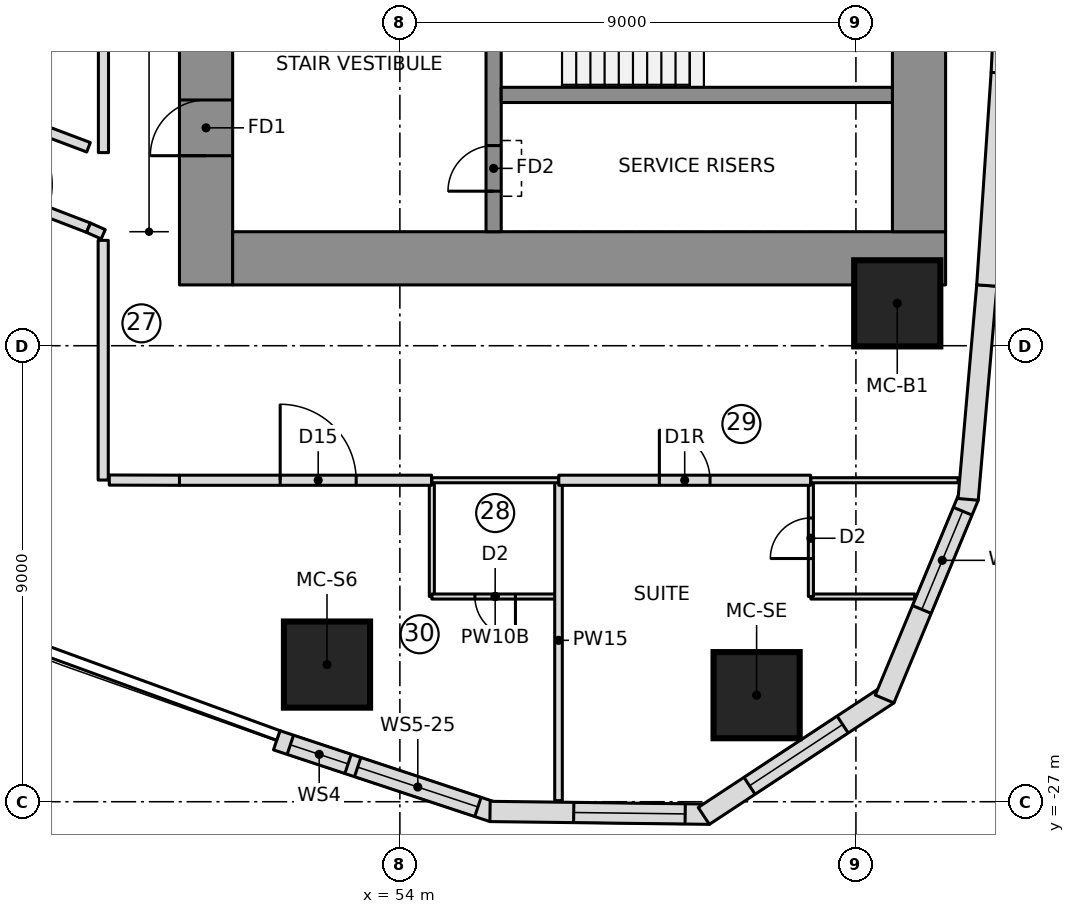
"""IFC4 building model, lengths in metres.
Left out: names, types, materials, properties, quantities, classifications, styles, units other than length and angle.
Written with IfcOpenShell. Run it as: python <this file> out.ifc"""

import sys

from ifc_helpers import new_model, si_unit, direction, frame, frame_2d, origin, origin_2d, place, context, subcontext, project, spatial, polyline, rectangle, outline, extrude, element, fill, save


model = new_model("IFC4")
c1 = context("Model", 3, precision=1e-05, world=origin(), true_north=direction((0.0, 1.0)))
c2 = subcontext(c1, "Body", "Model", "MODEL_VIEW")
j1 = project(units=[si_unit("LENGTHUNIT", "METRE"), si_unit("PLANEANGLEUNIT", "RADIAN")], contexts=[c1])
p1 = place(None, origin())
s1 = spatial("IfcSite", under=j1, at=p1, CompositionType="ELEMENT")
p2 = place(p1, origin())
s2 = spatial("IfcBuilding", under=s1, at=p2, CompositionType="ELEMENT")
p3 = place(p2, frame((0.0, 0.0, 84.9)))
s3 = spatial("IfcBuildingStorey", under=s2, at=p3, CompositionType="ELEMENT", Elevation=84.9)
p4 = place(p3, frame((50.175, -16.8, 0.0), z_axis=(0.0, 0.0, 1.0), x_axis=(0.0, 1.0, 0.0)))
e1 = element("IfcWall", 1, at=p4, inside=s3, PredefinedType="SHEAR", context=c2, shape_type="SweptSolid", body=[
    extrude(rectangle(XDim=10.15, YDim=1.05, at=frame_2d((5.075, 0.0))), origin(), (0.0, 0.0, 1.0), 3.55),
])
p5 = place(p4, frame((2.55, 0.0, 0.0)))
e2 = element("IfcOpeningElement", 2, at=p5, cuts=e1, PredefinedType="OPENING", context=c2, shape_type="SweptSolid", body=[
    extrude(rectangle(XDim=1.1, YDim=2.1, at=frame_2d((0.55, 1.05))), frame((0.0, 0.535, 0.0), z_axis=(0.0, -1.0, 0.0), x_axis=(1.0, 0.0, 0.0)), (0.0, 0.0, 1.0), 1.07),
])
p6 = place(p3, frame((50.7, -16.275, 0.0), z_axis=(0.0, 0.0, 1.0), x_axis=(1.0, 0.0, 0.0)))
e3 = element("IfcWall", 3, at=p6, inside=s3, PredefinedType="SHEAR", context=c2, shape_type="SweptSolid", body=[
    extrude(rectangle(XDim=14.07, YDim=1.05, at=frame_2d((7.035, 0.0))), origin(), (0.0, 0.0, 1.0), 3.55),
])
p7 = place(p3, frame((64.245, -15.75, 0.0), z_axis=(0.0, 0.0, 1.0), x_axis=(0.0, 1.0, 0.0)))
e4 = element("IfcWall", 4, at=p7, inside=s3, PredefinedType="SHEAR", context=c2, shape_type="SweptSolid", body=[
    extrude(rectangle(XDim=6.361, YDim=1.05, at=frame_2d((3.181, 0.0))), origin(), (0.0, 0.0, 1.0), 3.55),
])
p8 = place(p3, frame((55.85, -15.75, 0.0), z_axis=(0.0, 0.0, 1.0), x_axis=(0.0, 1.0, 0.0)))
e5 = element("IfcWall", 5, at=p8, inside=s3, PredefinedType="SHEAR", context=c2, shape_type="SweptSolid", body=[
    extrude(rectangle(XDim=5.4, YDim=0.3, at=frame_2d((2.7, 0.0))), origin(), (0.0, 0.0, 1.0), 3.55),
])
p9 = place(p8, frame((3.6, 0.0, 0.0)))
e6 = element("IfcOpeningElement", 6, at=p9, cuts=e5, PredefinedType="OPENING", context=c2, shape_type="SweptSolid", body=[
    extrude(rectangle(XDim=1.1, YDim=2.1, at=frame_2d((0.55, 1.05))), frame((0.0, 0.16, 0.0), z_axis=(0.0, -1.0, 0.0), x_axis=(1.0, 0.0, 0.0)), (0.0, 0.0, 1.0), 0.32),
])
p10 = place(p8, frame((0.8, 0.0, 0.0)))
e7 = element("IfcOpeningElement", 7, at=p10, cuts=e5, PredefinedType="OPENING", context=c2, shape_type="SweptSolid", body=[
    extrude(rectangle(XDim=0.9, YDim=2.1, at=frame_2d((0.45, 1.05))), frame((0.0, 0.16, 0.0), z_axis=(0.0, -1.0, 0.0), x_axis=(1.0, 0.0, 0.0)), (0.0, 0.0, 1.0), 0.32),
])
p11 = place(p3, frame((56.0, -13.05, 0.0), z_axis=(0.0, 0.0, 1.0), x_axis=(1.0, 0.0, 0.0)))
e8 = element("IfcWall", 8, at=p11, inside=s3, PredefinedType="SHEAR", context=c2, shape_type="SweptSolid", body=[
    extrude(rectangle(XDim=7.72, YDim=0.3, at=frame_2d((3.86, 0.0))), origin(), (0.0, 0.0, 1.0), 3.55),
])
for number, where, z_axis, x_axis in (
    (9, (52.562, -24.293, 0.0), (0.0, 0.0, 1.0), (1.0, 0.0, 0.0)),
    (10, (61.04, -24.897, 0.0), (0.0, 0.0, 1.0), (1.0, 0.0, 0.0)),
    (11, (63.816, -17.164, 0.0), (0.0, 0.0, 1.0), (1.0, 0.0, 0.0)),
):
    element("IfcColumn", number, at=place(p3, frame(where, z_axis=z_axis, x_axis=x_axis)), inside=s3, PredefinedType="COLUMN", context=c2, shape_type="SweptSolid", body=[
        extrude(rectangle(XDim=1.7, YDim=1.7, at=origin_2d()), origin(), (0.0, 0.0, 1.0), 3.55),
    ])
p12 = place(p3, frame((51.569, -25.787, 0.0), z_axis=(0.0, 0.0, 1.0), x_axis=(0.94925004851, -0.314522408429, 0.0)))
e12 = element("IfcWall", 12, at=p12, inside=s3, PredefinedType="NOTDEFINED", context=c2, shape_type="SweptSolid", body=[
    extrude(outline(polyline([(0.0, -0.2), (4.499, -0.2), (4.437, 0.2), (0.0, 0.2), (0.0, -0.2)])), origin(), (0.0, 0.0, 1.0), 3.25),
])
p13 = place(p12, frame((0.284, 0.0, 0.9)))
e13 = element("IfcOpeningElement", 13, at=p13, cuts=e12, PredefinedType="OPENING", context=c2, shape_type="SweptSolid", body=[
    extrude(rectangle(XDim=1.2, YDim=1.8, at=frame_2d((0.6, 0.9))), frame((0.0, 0.21, 0.0), z_axis=(0.0, -1.0, 0.0), x_axis=(1.0, 0.0, 0.0)), (0.0, 0.0, 1.0), 0.42),
])
p14 = place(p12, frame((1.684, 0.0, 0.9)))
e14 = element("IfcOpeningElement", 14, at=p14, cuts=e12, PredefinedType="OPENING", context=c2, shape_type="SweptSolid", body=[
    extrude(rectangle(XDim=2.5, YDim=1.8, at=frame_2d((1.25, 0.9))), frame((0.0, 0.21, 0.0), z_axis=(0.0, -1.0, 0.0), x_axis=(1.0, 0.0, 0.0)), (0.0, 0.0, 1.0), 0.42),
])
p15 = place(p3, frame((55.81, -27.192, 0.0), z_axis=(0.0, 0.0, 1.0), x_axis=(0.999919718849, -0.012671063772, 0.0)))
e15 = element("IfcWall", 15, at=p15, inside=s3, PredefinedType="NOTDEFINED", context=c2, shape_type="SweptSolid", body=[
    extrude(outline(polyline([(-0.031, -0.2), (4.3, -0.2), (4.177, 0.2), (0.031, 0.2), (-0.031, -0.2)])), origin(), (0.0, 0.0, 1.0), 3.25),
])
p16 = place(p15, frame((1.621, 0.0, 0.6)))
e16 = element("IfcOpeningElement", 16, at=p16, cuts=e15, PredefinedType="OPENING", context=c2, shape_type="SweptSolid", body=[
    extrude(outline(polyline([(0.0, 1.35), (0.084, 1.771), (0.322, 2.128), (0.679, 2.366), (1.1, 2.45), (1.521, 2.366), (1.878, 2.128), (2.116, 1.771), (2.2, 1.35), (2.2, 1.1), (2.116, 0.679), (1.878, 0.322), (1.521, 0.084), (1.1, 0.0), (0.679, 0.084), (0.322, 0.322), (0.084, 0.679), (0.0, 1.1), (0.0, 1.35)])), frame((0.0, 0.21, 0.0), z_axis=(0.0, -1.0, 0.0), x_axis=(1.0, 0.0, 0.0)), (0.0, 0.0, 1.0), 0.42),
])
p17 = place(p3, frame((60.049, -27.246, 0.0), z_axis=(0.0, 0.0, 1.0), x_axis=(0.835340523653, 0.549732852887, 0.0)))
e17 = element("IfcWall", 17, at=p17, inside=s3, PredefinedType="NOTDEFINED", context=c2, shape_type="SweptSolid", body=[
    extrude(outline(polyline([(-0.061, -0.2), (4.3, -0.2), (4.178, 0.2), (0.061, 0.2), (-0.061, -0.2)])), origin(), (0.0, 0.0, 1.0), 3.25),
])
p18 = place(p17, frame((1.02, 0.0, 0.6)))
e18 = element("IfcOpeningElement", 18, at=p18, cuts=e17, PredefinedType="OPENING", context=c2, shape_type="SweptSolid", body=[
    extrude(outline(polyline([(0.0, 1.35), (0.084, 1.771), (0.322, 2.128), (0.679, 2.366), (1.1, 2.45), (1.521, 2.366), (1.878, 2.128), (2.116, 1.771), (2.2, 1.35), (2.2, 1.1), (2.116, 0.679), (1.878, 0.322), (1.521, 0.084), (1.1, 0.0), (0.679, 0.084), (0.322, 0.322), (0.084, 0.679), (0.0, 1.1), (0.0, 1.35)])), frame((0.0, 0.21, 0.0), z_axis=(0.0, -1.0, 0.0), x_axis=(1.0, 0.0, 0.0)), (0.0, 0.0, 1.0), 0.42),
])
p19 = place(p3, frame((63.59, -24.916, 0.0), z_axis=(0.0, 0.0, 1.0), x_axis=(0.383997751971, 0.923334027577, 0.0)))
e19 = element("IfcWall", 19, at=p19, inside=s3, PredefinedType="NOTDEFINED", context=c2, shape_type="SweptSolid", body=[
    extrude(outline(polyline([(-0.061, -0.2), (4.27, -0.2), (4.208, 0.2), (0.061, 0.2), (-0.061, -0.2)])), origin(), (0.0, 0.0, 1.0), 3.25),
])
p20 = place(p19, frame((1.852, 0.0, 0.6)))
e20 = element("IfcOpeningElement", 20, at=p20, cuts=e19, PredefinedType="OPENING", context=c2, shape_type="SweptSolid", body=[
    extrude(outline(polyline([(0.0, 1.4), (0.08, 1.802), (0.308, 2.142), (0.648, 2.37), (1.05, 2.45), (1.452, 2.37), (1.792, 2.142), (2.02, 1.802), (2.1, 1.4), (2.1, 1.05), (2.02, 0.648), (1.792, 0.308), (1.452, 0.08), (1.05, 0.0), (0.648, 0.08), (0.308, 0.308), (0.08, 0.648), (0.0, 1.05), (0.0, 1.4)])), frame((0.0, 0.21, 0.0), z_axis=(0.0, -1.0, 0.0), x_axis=(1.0, 0.0, 0.0)), (0.0, 0.0, 1.0), 0.42),
])
p21 = place(p3, frame((65.217, -21.002, 0.0), z_axis=(0.0, 0.0, 1.0), x_axis=(0.086992730434, 0.996208946382, 0.0)))
e21 = element("IfcWall", 21, at=p21, inside=s3, PredefinedType="NOTDEFINED", context=c2, shape_type="SweptSolid", body=[
    extrude(outline(polyline([(-0.031, -0.2), (4.209, -0.2), (4.205, 0.2), (0.031, 0.2), (-0.031, -0.2)])), origin(), (0.0, 0.0, 1.0), 3.25),
])
p22 = place(p3, frame((65.583, -16.811, 0.0), z_axis=(0.0, 0.0, 1.0), x_axis=(0.067724559895, 0.997704056315, 0.0)))
e22 = element("IfcWall", 22, at=p22, inside=s3, PredefinedType="NOTDEFINED", context=c2, shape_type="SweptSolid", body=[
    extrude(outline(polyline([(-0.002, -0.2), (4.209, -0.2), (4.205, 0.2), (0.002, 0.2), (-0.002, -0.2)])), origin(), (0.0, 0.0, 1.0), 3.25),
])
p23 = place(p3, frame((65.868, -12.614, 0.0), z_axis=(0.0, 0.0, 1.0), x_axis=(0.048342691508, 0.998830808585, 0.0)))
e23 = element("IfcWall", 23, at=p23, inside=s3, PredefinedType="NOTDEFINED", context=c2, shape_type="SweptSolid", body=[
    extrude(outline(polyline([(-0.002, -0.2), (4.209, -0.2), (4.205, 0.2), (0.002, 0.2), (-0.002, -0.2)])), origin(), (0.0, 0.0, 1.0), 3.25),
])
p24 = place(p3, frame((54.631, -22.95, 0.0), z_axis=(0.0, 0.0, 1.0), x_axis=(0.0, 1.0, 0.0)))
e24 = element("IfcWall", 24, at=p24, inside=s3, PredefinedType="PARTITIONING", context=c2, shape_type="SweptSolid", body=[
    extrude(rectangle(XDim=2.3, YDim=0.1, at=frame_2d((1.15, 0.0))), origin(), (0.0, 0.0, 1.0), 3.25),
])
p25 = place(p3, frame((57.131, -22.95, 0.0), z_axis=(0.0, 0.0, 1.0), x_axis=(-1.0, 0.0, 0.0)))
e25 = element("IfcWall", 25, at=p25, inside=s3, PredefinedType="PARTITIONING", context=c2, shape_type="SweptSolid", body=[
    extrude(rectangle(XDim=2.5, YDim=0.1, at=frame_2d((1.25, 0.0))), origin(), (0.0, 0.0, 1.0), 3.25),
])
p26 = place(p25, frame((0.85, 0.0, 0.0)))
e26 = element("IfcOpeningElement", 26, at=p26, cuts=e25, PredefinedType="OPENING", context=c2, shape_type="SweptSolid", body=[
    extrude(rectangle(XDim=0.8, YDim=2.1, at=frame_2d((0.4, 1.05))), frame((0.0, 0.06, 0.0), z_axis=(0.0, -1.0, 0.0), x_axis=(1.0, 0.0, 0.0)), (0.0, 0.0, 1.0), 0.12),
])
p27 = place(p3, frame((64.16, -22.95, 0.0), z_axis=(0.0, 0.0, 1.0), x_axis=(-1.0, 0.0, 0.0)))
e27 = element("IfcWall", 27, at=p27, inside=s3, PredefinedType="PARTITIONING", context=c2, shape_type="SweptSolid", body=[
    extrude(rectangle(XDim=2.049, YDim=0.1, at=frame_2d((1.025, 0.0))), origin(), (0.0, 0.0, 1.0), 3.25),
])
p28 = place(p3, frame((62.111, -22.95, 0.0), z_axis=(0.0, 0.0, 1.0), x_axis=(0.0, 1.0, 0.0)))
e28 = element("IfcWall", 28, at=p28, inside=s3, PredefinedType="PARTITIONING", context=c2, shape_type="SweptSolid", body=[
    extrude(rectangle(XDim=2.3, YDim=0.1, at=frame_2d((1.15, 0.0))), origin(), (0.0, 0.0, 1.0), 3.25),
])
p29 = place(p28, frame((0.75, 0.0, 0.0)))
e29 = element("IfcOpeningElement", 29, at=p29, cuts=e28, PredefinedType="OPENING", context=c2, shape_type="SweptSolid", body=[
    extrude(rectangle(XDim=0.8, YDim=2.1, at=frame_2d((0.4, 1.05))), frame((0.0, 0.06, 0.0), z_axis=(0.0, -1.0, 0.0), x_axis=(1.0, 0.0, 0.0)), (0.0, 0.0, 1.0), 0.12),
])
p30 = place(p3, frame((57.131, -26.979, 0.0), z_axis=(0.0, 0.0, 1.0), x_axis=(0.0, 1.0, 0.0)))
e30 = element("IfcWall", 30, at=p30, inside=s3, PredefinedType="PARTITIONING", context=c2, shape_type="SweptSolid", body=[
    extrude(rectangle(XDim=6.329, YDim=0.15, at=frame_2d((3.165, 0.0))), origin(), (0.0, 0.0, 1.0), 3.25),
])
p31 = place(p3, frame((49.65, -20.655, 0.0), z_axis=(0.0, 0.0, 1.0), x_axis=(1.0, 0.0, 0.0)))
e31 = element("IfcWall", 31, at=p31, inside=s3, PredefinedType="PARTITIONING", context=c2, shape_type="SweptSolid", body=[
    extrude(rectangle(XDim=4.976, YDim=0.2, at=frame_2d((2.488, 0.0))), origin(), (0.0, 0.0, 1.0), 3.25),
])
p32 = place(p31, frame((1.988, 0.0, 0.0)))
e32 = element("IfcOpeningElement", 32, at=p32, cuts=e31, PredefinedType="OPENING", context=c2, shape_type="SweptSolid", body=[
    extrude(rectangle(XDim=1.5, YDim=2.1, at=frame_2d((0.75, 1.05))), frame((0.0, 0.11, 0.0), z_axis=(0.0, -1.0, 0.0), x_axis=(1.0, 0.0, 0.0)), (0.0, 0.0, 1.0), 0.22),
])
p33 = place(p3, frame((57.135, -20.655, 0.0), z_axis=(0.0, 0.0, 1.0), x_axis=(1.0, 0.0, 0.0)))
e33 = element("IfcWall", 33, at=p33, inside=s3, PredefinedType="PARTITIONING", context=c2, shape_type="SweptSolid", body=[
    extrude(rectangle(XDim=4.971, YDim=0.2, at=frame_2d((2.485, 0.0))), origin(), (0.0, 0.0, 1.0), 3.25),
])
p34 = place(p33, frame((1.985, 0.0, 0.0)))
e34 = element("IfcOpeningElement", 34, at=p34, cuts=e33, PredefinedType="OPENING", context=c2, shape_type="SweptSolid", body=[
    extrude(rectangle(XDim=1.0, YDim=2.1, at=frame_2d((0.5, 1.05))), frame((0.0, 0.11, 0.0), z_axis=(0.0, -1.0, 0.0), x_axis=(1.0, 0.0, 0.0)), (0.0, 0.0, 1.0), 0.22),
])
p35 = place(p3, frame((54.631, -20.655, 0.0), z_axis=(0.0, 0.0, 1.0), x_axis=(1.0, 0.0, 0.0)))
e35 = element("IfcWall", 35, at=p35, inside=s3, PredefinedType="PARTITIONING", context=c2, shape_type="SweptSolid", body=[
    extrude(rectangle(XDim=2.5, YDim=0.1, at=frame_2d((1.25, 0.0))), origin(), (0.0, 0.0, 1.0), 3.25),
])
p36 = place(p3, frame((62.111, -20.655, 0.0), z_axis=(0.0, 0.0, 1.0), x_axis=(1.0, 0.0, 0.0)))
e36 = element("IfcWall", 36, at=p36, inside=s3, PredefinedType="PARTITIONING", context=c2, shape_type="SweptSolid", body=[
    extrude(rectangle(XDim=2.906, YDim=0.1, at=frame_2d((1.453, 0.0))), origin(), (0.0, 0.0, 1.0), 3.25),
])
p37 = place(p3, frame((42.791, -13.724, 0.0), z_axis=(0.0, 0.0, 1.0), x_axis=(0.933356043573, -0.358951940969, 0.0)))
e37 = element("IfcWall", 37, at=p37, inside=s3, PredefinedType="PARTITIONING", context=c2, shape_type="SweptSolid", body=[
    extrude(rectangle(XDim=5.426, YDim=0.2, at=frame_2d((2.713, 0.0))), origin(), (0.0, 0.0, 1.0), 3.25),
])
p38 = place(p37, frame((3.05, 0.0, 0.0)))
e38 = element("IfcOpeningElement", 38, at=p38, cuts=e37, PredefinedType="OPENING", context=c2, shape_type="SweptSolid", body=[
    extrude(rectangle(XDim=1.5, YDim=2.1, at=frame_2d((0.75, 1.05))), frame((0.0, 0.11, 0.0), z_axis=(0.0, -1.0, 0.0), x_axis=(1.0, 0.0, 0.0)), (0.0, 0.0, 1.0), 0.22),
])
p39 = place(p3, frame((47.855, -14.083, 0.0), z_axis=(0.0, 0.0, 1.0), x_axis=(-0.935907269358, 0.352246480696, 0.0)))
e39 = element("IfcWall", 39, at=p39, inside=s3, PredefinedType="PARTITIONING", context=c2, shape_type="SweptSolid", body=[
    extrude(rectangle(XDim=1.239, YDim=0.2, at=frame_2d((0.619, 0.0))), origin(), (0.0, 0.0, 1.0), 3.25),
])
p40 = place(p3, frame((48.15, 14.189, 0.0), z_axis=(0.0, 0.0, 1.0), x_axis=(0.0, -1.0, 0.0)))
e40 = element("IfcWall", 40, at=p40, inside=s3, PredefinedType="PARTITIONING", context=c2, shape_type="SweptSolid", body=[
    extrude(rectangle(XDim=28.377, YDim=0.2, at=frame_2d((14.189, 0.0))), origin(), (0.0, 0.0, 1.0), 3.25),
])
p41 = place(p3, frame((47.855, -15.671, 0.0), z_axis=(0.0, 0.0, 1.0), x_axis=(0.91336751773, -0.407136067617, 0.0)))
e41 = element("IfcWall", 41, at=p41, inside=s3, PredefinedType="PARTITIONING", context=c2, shape_type="SweptSolid", body=[
    extrude(rectangle(XDim=0.318, YDim=0.2, at=frame_2d((0.159, 0.0))), origin(), (0.0, 0.0, 1.0), 3.25),
])
p42 = place(p3, frame((48.145, -15.92, 0.0), z_axis=(0.0, 0.0, 1.0), x_axis=(-5.1610239e-05, -0.999999998668, 0.0)))
e42 = element("IfcWall", 42, at=p42, inside=s3, PredefinedType="PARTITIONING", context=c2, shape_type="SweptSolid", body=[
    extrude(rectangle(XDim=4.73, YDim=0.2, at=frame_2d((2.365, 0.0))), origin(), (0.0, 0.0, 1.0), 3.25),
])
p43 = place(p3, frame((48.265, -20.651, 0.0), z_axis=(0.0, 0.0, 1.0), x_axis=(0.999996503144, -0.002644560569, 0.0)))
e43 = element("IfcWall", 43, at=p43, inside=s3, PredefinedType="PARTITIONING", context=c2, shape_type="SweptSolid", body=[
    extrude(rectangle(XDim=1.385, YDim=0.2, at=frame_2d((0.692, 0.0))), origin(), (0.0, 0.0, 1.0), 3.25),
])
p44 = place(p13, origin())
e44 = element("IfcWindow", 44, at=p44, inside=s3, PartitioningType="SINGLE_PANEL", PredefinedType="WINDOW", context=c2, shape_type="SweptSolid", body=[
    extrude(rectangle(XDim=1.2, YDim=1.8, at=frame_2d((0.6, 0.9))), frame((0.0, 0.17, 0.0), z_axis=(0.0, -1.0, 0.0), x_axis=(1.0, 0.0, 0.0)), (0.0, 0.0, 1.0), 0.06),
])
fill(e13, e44)
p45 = place(p14, origin())
e45 = element("IfcWindow", 45, at=p45, inside=s3, PartitioningType="SINGLE_PANEL", PredefinedType="WINDOW", context=c2, shape_type="SweptSolid", body=[
    extrude(rectangle(XDim=2.5, YDim=1.8, at=frame_2d((1.25, 0.9))), frame((0.0, 0.17, 0.0), z_axis=(0.0, -1.0, 0.0), x_axis=(1.0, 0.0, 0.0)), (0.0, 0.0, 1.0), 0.06),
])
fill(e14, e45)
p46 = place(p16, origin())
e46 = element("IfcWindow", 46, at=p46, inside=s3, PartitioningType="SINGLE_PANEL", PredefinedType="WINDOW", context=c2, shape_type="SweptSolid", body=[
    extrude(outline(polyline([(0.0, 1.35), (0.084, 1.771), (0.322, 2.128), (0.679, 2.366), (1.1, 2.45), (1.521, 2.366), (1.878, 2.128), (2.116, 1.771), (2.2, 1.35), (2.2, 1.1), (2.116, 0.679), (1.878, 0.322), (1.521, 0.084), (1.1, 0.0), (0.679, 0.084), (0.322, 0.322), (0.084, 0.679), (0.0, 1.1), (0.0, 1.35)])), frame((0.0, 0.17, 0.0), z_axis=(0.0, -1.0, 0.0), x_axis=(1.0, 0.0, 0.0)), (0.0, 0.0, 1.0), 0.06),
])
fill(e16, e46)
p47 = place(p18, origin())
e47 = element("IfcWindow", 47, at=p47, inside=s3, PartitioningType="SINGLE_PANEL", PredefinedType="WINDOW", context=c2, shape_type="SweptSolid", body=[
    extrude(outline(polyline([(0.0, 1.35), (0.084, 1.771), (0.322, 2.128), (0.679, 2.366), (1.1, 2.45), (1.521, 2.366), (1.878, 2.128), (2.116, 1.771), (2.2, 1.35), (2.2, 1.1), (2.116, 0.679), (1.878, 0.322), (1.521, 0.084), (1.1, 0.0), (0.679, 0.084), (0.322, 0.322), (0.084, 0.679), (0.0, 1.1), (0.0, 1.35)])), frame((0.0, 0.17, 0.0), z_axis=(0.0, -1.0, 0.0), x_axis=(1.0, 0.0, 0.0)), (0.0, 0.0, 1.0), 0.06),
])
fill(e18, e47)
p48 = place(p20, origin())
e48 = element("IfcWindow", 48, at=p48, inside=s3, PartitioningType="SINGLE_PANEL", PredefinedType="WINDOW", context=c2, shape_type="SweptSolid", body=[
    extrude(outline(polyline([(0.0, 1.4), (0.08, 1.802), (0.308, 2.142), (0.648, 2.37), (1.05, 2.45), (1.452, 2.37), (1.792, 2.142), (2.02, 1.802), (2.1, 1.4), (2.1, 1.05), (2.02, 0.648), (1.792, 0.308), (1.452, 0.08), (1.05, 0.0), (0.648, 0.08), (0.308, 0.308), (0.08, 0.648), (0.0, 1.05), (0.0, 1.4)])), frame((0.0, 0.17, 0.0), z_axis=(0.0, -1.0, 0.0), x_axis=(1.0, 0.0, 0.0)), (0.0, 0.0, 1.0), 0.06),
])
fill(e20, e48)
p49 = place(p26, origin())
e49 = element("IfcDoor", 49, at=p49, inside=s3, OperationType="SINGLE_SWING_LEFT", PredefinedType="DOOR", context=c2, shape_type="SweptSolid", body=[
    extrude(rectangle(XDim=0.8, YDim=2.1, at=frame_2d((0.4, 1.05))), frame((0.0, 0.025, 0.0), z_axis=(0.0, -1.0, 0.0), x_axis=(1.0, 0.0, 0.0)), (0.0, 0.0, 1.0), 0.05),
])
fill(e26, e49)
p50 = place(p29, origin())
e50 = element("IfcDoor", 50, at=p50, inside=s3, OperationType="SINGLE_SWING_LEFT", PredefinedType="DOOR", context=c2, shape_type="SweptSolid", body=[
    extrude(rectangle(XDim=0.8, YDim=2.1, at=frame_2d((0.4, 1.05))), frame((0.0, 0.025, 0.0), z_axis=(0.0, -1.0, 0.0), x_axis=(1.0, 0.0, 0.0)), (0.0, 0.0, 1.0), 0.05),
])
fill(e29, e50)
p51 = place(p32, origin())
e51 = element("IfcDoor", 51, at=p51, inside=s3, OperationType="DOUBLE_DOOR_SINGLE_SWING", PredefinedType="DOOR", context=c2, shape_type="SweptSolid", body=[
    extrude(rectangle(XDim=1.5, YDim=2.1, at=frame_2d((0.75, 1.05))), frame((0.0, 0.025, 0.0), z_axis=(0.0, -1.0, 0.0), x_axis=(1.0, 0.0, 0.0)), (0.0, 0.0, 1.0), 0.05),
])
fill(e32, e51)
p52 = place(p34, origin())
e52 = element("IfcDoor", 52, at=p52, inside=s3, OperationType="SINGLE_SWING_RIGHT", PredefinedType="DOOR", context=c2, shape_type="SweptSolid", body=[
    extrude(rectangle(XDim=1.0, YDim=2.1, at=frame_2d((0.5, 1.05))), frame((0.0, 0.025, 0.0), z_axis=(0.0, -1.0, 0.0), x_axis=(1.0, 0.0, 0.0)), (0.0, 0.0, 1.0), 0.05),
])
fill(e34, e52)
p53 = place(p5, origin())
e53 = element("IfcDoor", 53, at=p53, inside=s3, OperationType="SINGLE_SWING_RIGHT", PredefinedType="DOOR", context=c2, shape_type="SweptSolid", body=[
    extrude(rectangle(XDim=1.1, YDim=2.1, at=frame_2d((0.55, 1.05))), frame((0.0, 0.025, 0.0), z_axis=(0.0, -1.0, 0.0), x_axis=(1.0, 0.0, 0.0)), (0.0, 0.0, 1.0), 0.05),
])
fill(e2, e53)
p54 = place(p10, origin())
e54 = element("IfcDoor", 54, at=p54, inside=s3, OperationType="SINGLE_SWING_LEFT", PredefinedType="DOOR", context=c2, shape_type="SweptSolid", body=[
    extrude(rectangle(XDim=0.9, YDim=2.1, at=frame_2d((0.45, 1.05))), frame((0.0, 0.025, 0.0), z_axis=(0.0, -1.0, 0.0), x_axis=(1.0, 0.0, 0.0)), (0.0, 0.0, 1.0), 0.05),
])
fill(e7, e54)
save(model, sys.argv[1])
